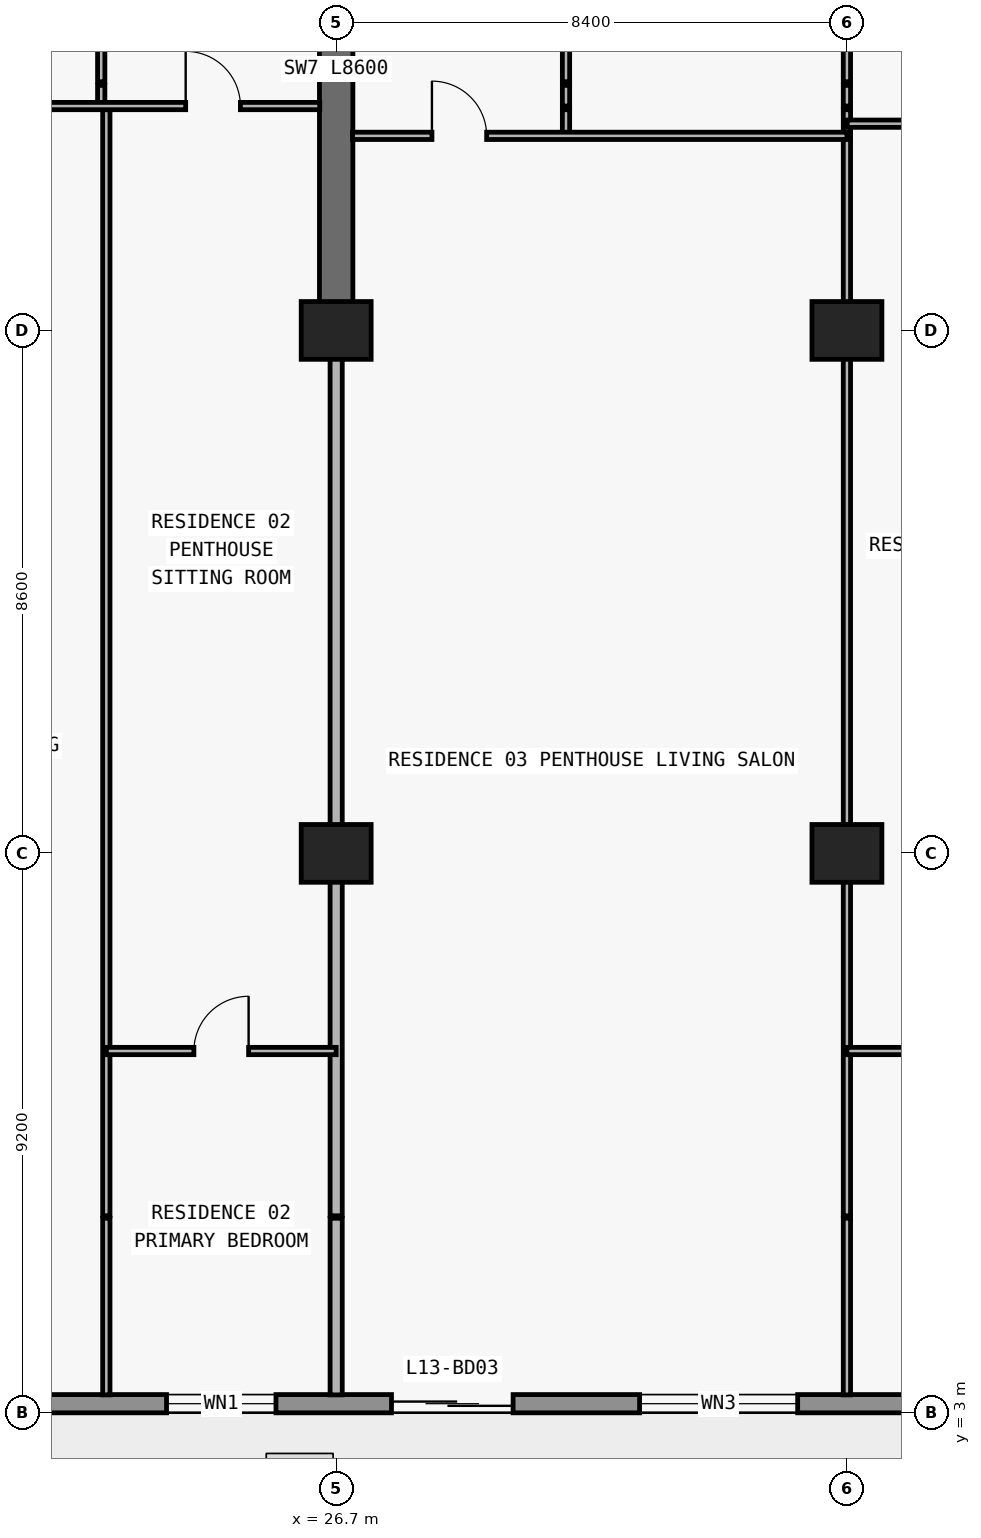
"""IFC4 building model, lengths in metres.
Left out: names, types, materials, properties, quantities, classifications, styles, units other than length and angle.
Written with IfcOpenShell. Run it as: python <this file> out.ifc"""

import sys

from ifc_helpers import new_model, si_unit, direction, frame, frame_2d, origin, origin_2d, place, context, subcontext, project, spatial, rectangle, extrude, element, fill, save


model = new_model("IFC4")
c1 = context("Model", 3, precision=1e-05, world=origin(), true_north=direction((0.0, 1.0)))
c2 = subcontext(c1, "Body", "Model", "MODEL_VIEW")
j1 = project(units=[si_unit("LENGTHUNIT", "METRE"), si_unit("PLANEANGLEUNIT", "RADIAN")], contexts=[c1])
p1 = place(None, origin())
s1 = spatial("IfcSite", under=j1, at=p1, CompositionType="ELEMENT")
p2 = place(p1, origin())
s2 = spatial("IfcBuilding", under=s1, at=p2, CompositionType="ELEMENT")
p3 = place(p2, frame((0.0, 0.0, 53.1)))
s3 = spatial("IfcBuildingStorey", under=s2, at=p3, CompositionType="ELEMENT", Elevation=53.1)
for number, where, z_axis, x_axis in (
    (1, (26.7, 12.2, 0.0), (0.0, 0.0, 1.0), (1.0, 0.0, 0.0)),
    (2, (35.1, 12.2, 0.0), (0.0, 0.0, 1.0), (1.0, 0.0, 0.0)),
    (3, (26.7, 20.8, 0.0), (0.0, 0.0, 1.0), (1.0, 0.0, 0.0)),
    (4, (35.1, 20.8, 0.0), (0.0, 0.0, 1.0), (1.0, 0.0, 0.0)),
):
    element("IfcColumn", number, at=place(p3, frame(where, z_axis=z_axis, x_axis=x_axis)), inside=s3, PredefinedType="COLUMN", context=c2, shape_type="SweptSolid", body=[
        extrude(rectangle(XDim=1.15, YDim=0.95, at=origin_2d()), origin(), (0.0, 0.0, 1.0), 3.05),
    ])
p4 = place(p3, frame((26.7, 20.8, 0.0), z_axis=(0.0, 0.0, 1.0), x_axis=(0.0, 1.0, 0.0)))
e5 = element("IfcWall", 5, at=p4, inside=s3, PredefinedType="SHEAR", context=c2, shape_type="SweptSolid", body=[
    extrude(rectangle(XDim=8.6, YDim=0.55, at=frame_2d((4.3, 0.0))), origin(), (0.0, 0.0, 1.0), 3.05),
])
p5 = place(p3, frame((72.7, 3.15, 0.0), z_axis=(0.0, 0.0, 1.0), x_axis=(-1.0, 0.0, 0.0)))
e6 = element("IfcWall", 6, at=p5, inside=s3, PredefinedType="STANDARD", context=c2, shape_type="SweptSolid", body=[
    extrude(rectangle(XDim=67.6, YDim=0.3, at=frame_2d((33.8, 0.0))), origin(), (0.0, 0.0, 1.0), 3.05),
])
p6 = place(p5, frame((59.826, 0.0, 0.0)))
e7 = element("IfcOpeningElement", 7, at=p6, cuts=e6, PredefinedType="OPENING", context=c2, shape_type="SweptSolid", body=[
    extrude(rectangle(XDim=2.0, YDim=2.3, at=frame_2d((1.0, 1.15))), frame((0.0, 0.16, 0.0), z_axis=(0.0, -1.0, 0.0), x_axis=(1.0, 0.0, 0.0)), (0.0, 0.0, 1.0), 0.32),
])
p7 = place(p5, frame((55.526, 0.0, 0.85)))
e8 = element("IfcOpeningElement", 8, at=p7, cuts=e6, PredefinedType="OPENING", context=c2, shape_type="SweptSolid", body=[
    extrude(rectangle(XDim=2.2, YDim=1.55, at=frame_2d((1.1, 0.775))), frame((0.0, 0.16, 0.0), z_axis=(0.0, -1.0, 0.0), x_axis=(1.0, 0.0, 0.0)), (0.0, 0.0, 1.0), 0.32),
])
p8 = place(p5, frame((51.09, 0.0, 0.0)))
e9 = element("IfcOpeningElement", 9, at=p8, cuts=e6, PredefinedType="OPENING", context=c2, shape_type="SweptSolid", body=[
    extrude(rectangle(XDim=2.0, YDim=2.3, at=frame_2d((1.0, 1.15))), frame((0.0, 0.16, 0.0), z_axis=(0.0, -1.0, 0.0), x_axis=(1.0, 0.0, 0.0)), (0.0, 0.0, 1.0), 0.32),
])
p9 = place(p5, frame((46.99, 0.0, 0.85)))
e10 = element("IfcOpeningElement", 10, at=p9, cuts=e6, PredefinedType="OPENING", context=c2, shape_type="SweptSolid", body=[
    extrude(rectangle(XDim=1.8, YDim=1.55, at=frame_2d((0.9, 0.775))), frame((0.0, 0.16, 0.0), z_axis=(0.0, -1.0, 0.0), x_axis=(1.0, 0.0, 0.0)), (0.0, 0.0, 1.0), 0.32),
])
p10 = place(p5, frame((43.09, 0.0, 0.0)))
e11 = element("IfcOpeningElement", 11, at=p10, cuts=e6, PredefinedType="OPENING", context=c2, shape_type="SweptSolid", body=[
    extrude(rectangle(XDim=2.0, YDim=2.3, at=frame_2d((1.0, 1.15))), frame((0.0, 0.16, 0.0), z_axis=(0.0, -1.0, 0.0), x_axis=(1.0, 0.0, 0.0)), (0.0, 0.0, 1.0), 0.32),
])
p11 = place(p5, frame((38.41, 0.0, 0.65)))
e12 = element("IfcOpeningElement", 12, at=p11, cuts=e6, PredefinedType="OPENING", context=c2, shape_type="SweptSolid", body=[
    extrude(rectangle(XDim=2.6, YDim=1.85, at=frame_2d((1.3, 0.925))), frame((0.0, 0.16, 0.0), z_axis=(0.0, -1.0, 0.0), x_axis=(1.0, 0.0, 0.0)), (0.0, 0.0, 1.0), 0.32),
])
p12 = place(p5, frame((32.7, 0.0, 0.85)))
e13 = element("IfcOpeningElement", 13, at=p12, cuts=e6, PredefinedType="OPENING", context=c2, shape_type="SweptSolid", body=[
    extrude(rectangle(XDim=2.2, YDim=1.55, at=frame_2d((1.1, 0.775))), frame((0.0, 0.16, 0.0), z_axis=(0.0, -1.0, 0.0), x_axis=(1.0, 0.0, 0.0)), (0.0, 0.0, 1.0), 0.32),
])
p13 = place(p5, frame((24.7, 0.0, 0.85)))
e14 = element("IfcOpeningElement", 14, at=p13, cuts=e6, PredefinedType="OPENING", context=c2, shape_type="SweptSolid", body=[
    extrude(rectangle(XDim=2.2, YDim=1.55, at=frame_2d((1.1, 0.775))), frame((0.0, 0.16, 0.0), z_axis=(0.0, -1.0, 0.0), x_axis=(1.0, 0.0, 0.0)), (0.0, 0.0, 1.0), 0.32),
])
p14 = place(p5, frame((18.29, 0.0, 0.0)))
e15 = element("IfcOpeningElement", 15, at=p14, cuts=e6, PredefinedType="OPENING", context=c2, shape_type="SweptSolid", body=[
    extrude(rectangle(XDim=2.0, YDim=2.3, at=frame_2d((1.0, 1.15))), frame((0.0, 0.16, 0.0), z_axis=(0.0, -1.0, 0.0), x_axis=(1.0, 0.0, 0.0)), (0.0, 0.0, 1.0), 0.32),
])
p15 = place(p5, frame((14.19, 0.0, 0.85)))
e16 = element("IfcOpeningElement", 16, at=p15, cuts=e6, PredefinedType="OPENING", context=c2, shape_type="SweptSolid", body=[
    extrude(rectangle(XDim=1.8, YDim=1.55, at=frame_2d((0.9, 0.775))), frame((0.0, 0.16, 0.0), z_axis=(0.0, -1.0, 0.0), x_axis=(1.0, 0.0, 0.0)), (0.0, 0.0, 1.0), 0.32),
])
p16 = place(p5, frame((10.226, 0.0, 0.0)))
e17 = element("IfcOpeningElement", 17, at=p16, cuts=e6, PredefinedType="OPENING", context=c2, shape_type="SweptSolid", body=[
    extrude(rectangle(XDim=2.0, YDim=2.3, at=frame_2d((1.0, 1.15))), frame((0.0, 0.16, 0.0), z_axis=(0.0, -1.0, 0.0), x_axis=(1.0, 0.0, 0.0)), (0.0, 0.0, 1.0), 0.32),
])
p17 = place(p5, frame((5.926, 0.0, 0.85)))
e18 = element("IfcOpeningElement", 18, at=p17, cuts=e6, PredefinedType="OPENING", context=c2, shape_type="SweptSolid", body=[
    extrude(rectangle(XDim=2.2, YDim=1.55, at=frame_2d((1.1, 0.775))), frame((0.0, 0.16, 0.0), z_axis=(0.0, -1.0, 0.0), x_axis=(1.0, 0.0, 0.0)), (0.0, 0.0, 1.0), 0.32),
])
p18 = place(p3, frame((22.836, 24.49, 0.0), z_axis=(0.0, 0.0, 1.0), x_axis=(0.0, 1.0, 0.0)))
e19 = element("IfcWall", 19, at=p18, inside=s3, PredefinedType="PARTITIONING", context=c2, shape_type="SweptSolid", body=[
    extrude(rectangle(XDim=0.34, YDim=0.12, at=frame_2d((0.17, 0.0))), origin(), (0.0, 0.0, 1.0), 3.05),
])
p19 = place(p3, frame((22.836, 24.89, 0.0), z_axis=(0.0, 0.0, 1.0), x_axis=(0.0, 1.0, 0.0)))
e20 = element("IfcWall", 20, at=p19, inside=s3, PredefinedType="PARTITIONING", context=c2, shape_type="SweptSolid", body=[
    extrude(rectangle(XDim=4.69, YDim=0.12, at=frame_2d((2.345, 0.0))), origin(), (0.0, 0.0, 1.0), 3.05),
])
p20 = place(p19, frame((1.895, 0.0, 0.0)))
e21 = element("IfcOpeningElement", 21, at=p20, cuts=e20, PredefinedType="OPENING", context=c2, shape_type="SweptSolid", body=[
    extrude(rectangle(XDim=0.9, YDim=2.15, at=frame_2d((0.45, 1.075))), frame((0.0, 0.07, 0.0), z_axis=(0.0, -1.0, 0.0), x_axis=(1.0, 0.0, 0.0)), (0.0, 0.0, 1.0), 0.14),
])
p21 = place(p3, frame((22.92, 3.295, 0.0), z_axis=(0.0, 0.0, 1.0), x_axis=(0.0, 1.0, 0.0)))
e22 = element("IfcWall", 22, at=p21, inside=s3, PredefinedType="PARTITIONING", context=c2, shape_type="SweptSolid", body=[
    extrude(rectangle(XDim=2.905, YDim=0.12, at=frame_2d((1.453, 0.0))), origin(), (0.0, 0.0, 1.0), 3.05),
])
p22 = place(p3, frame((22.92, 6.24, 0.0), z_axis=(0.0, 0.0, 1.0), x_axis=(0.0, 1.0, 0.0)))
e23 = element("IfcWall", 23, at=p22, inside=s3, PredefinedType="PARTITIONING", context=c2, shape_type="SweptSolid", body=[
    extrude(rectangle(XDim=18.19, YDim=0.12, at=frame_2d((9.095, 0.0))), origin(), (0.0, 0.0, 1.0), 3.05),
])
p23 = place(p3, frame((26.7, 3.295, 0.0), z_axis=(0.0, 0.0, 1.0), x_axis=(0.0, 1.0, 0.0)))
e24 = element("IfcWall", 24, at=p23, inside=s3, PredefinedType="PARTITIONING", context=c2, shape_type="SweptSolid", body=[
    extrude(rectangle(XDim=2.905, YDim=0.2, at=frame_2d((1.453, 0.0))), origin(), (0.0, 0.0, 1.0), 3.05),
])
p24 = place(p3, frame((26.7, 6.24, 0.0), z_axis=(0.0, 0.0, 1.0), x_axis=(0.0, 1.0, 0.0)))
e25 = element("IfcWall", 25, at=p24, inside=s3, PredefinedType="PARTITIONING", context=c2, shape_type="SweptSolid", body=[
    extrude(rectangle(XDim=14.555, YDim=0.2, at=frame_2d((7.277, 0.0))), origin(), (0.0, 0.0, 1.0), 2.11),
])
p25 = place(p3, frame((30.48, 24.0, 0.0), z_axis=(0.0, 0.0, 1.0), x_axis=(0.0, 1.0, 0.0)))
e26 = element("IfcWall", 26, at=p25, inside=s3, PredefinedType="PARTITIONING", context=c2, shape_type="SweptSolid", body=[
    extrude(rectangle(XDim=0.43, YDim=0.12, at=frame_2d((0.215, 0.0))), origin(), (0.0, 0.0, 1.0), 3.05),
])
p26 = place(p3, frame((30.48, 24.49, 0.0), z_axis=(0.0, 0.0, 1.0), x_axis=(0.0, 1.0, 0.0)))
e27 = element("IfcWall", 27, at=p26, inside=s3, PredefinedType="PARTITIONING", context=c2, shape_type="SweptSolid", body=[
    extrude(rectangle(XDim=0.34, YDim=0.12, at=frame_2d((0.17, 0.0))), origin(), (0.0, 0.0, 1.0), 3.05),
])
p27 = place(p3, frame((30.48, 24.89, 0.0), z_axis=(0.0, 0.0, 1.0), x_axis=(0.0, 1.0, 0.0)))
e28 = element("IfcWall", 28, at=p27, inside=s3, PredefinedType="PARTITIONING", context=c2, shape_type="SweptSolid", body=[
    extrude(rectangle(XDim=3.91, YDim=0.12, at=frame_2d((1.955, 0.0))), origin(), (0.0, 0.0, 1.0), 3.05),
])
p28 = place(p27, frame((1.505, 0.0, 0.0)))
e29 = element("IfcOpeningElement", 29, at=p28, cuts=e28, PredefinedType="OPENING", context=c2, shape_type="SweptSolid", body=[
    extrude(rectangle(XDim=0.9, YDim=2.15, at=frame_2d((0.45, 1.075))), frame((0.0, 0.07, 0.0), z_axis=(0.0, -1.0, 0.0), x_axis=(1.0, 0.0, 0.0)), (0.0, 0.0, 1.0), 0.14),
])
p29 = place(p3, frame((35.1, 3.295, 0.0), z_axis=(0.0, 0.0, 1.0), x_axis=(0.0, 1.0, 0.0)))
e30 = element("IfcWall", 30, at=p29, inside=s3, PredefinedType="PARTITIONING", context=c2, shape_type="SweptSolid", body=[
    extrude(rectangle(XDim=2.905, YDim=0.12, at=frame_2d((1.453, 0.0))), origin(), (0.0, 0.0, 1.0), 3.05),
])
p30 = place(p3, frame((35.1, 6.24, 0.0), z_axis=(0.0, 0.0, 1.0), x_axis=(0.0, 1.0, 0.0)))
e31 = element("IfcWall", 31, at=p30, inside=s3, PredefinedType="PARTITIONING", context=c2, shape_type="SweptSolid", body=[
    extrude(rectangle(XDim=18.19, YDim=0.12, at=frame_2d((9.095, 0.0))), origin(), (0.0, 0.0, 1.0), 2.11),
])
p31 = place(p3, frame((35.1, 24.49, 0.0), z_axis=(0.0, 0.0, 1.0), x_axis=(0.0, 1.0, 0.0)))
e32 = element("IfcWall", 32, at=p31, inside=s3, PredefinedType="PARTITIONING", context=c2, shape_type="SweptSolid", body=[
    extrude(rectangle(XDim=0.34, YDim=0.12, at=frame_2d((0.17, 0.0))), origin(), (0.0, 0.0, 1.0), 2.11),
])
p32 = place(p3, frame((35.1, 24.89, 0.0), z_axis=(0.0, 0.0, 1.0), x_axis=(0.0, 1.0, 0.0)))
e33 = element("IfcWall", 33, at=p32, inside=s3, PredefinedType="PARTITIONING", context=c2, shape_type="SweptSolid", body=[
    extrude(rectangle(XDim=4.69, YDim=0.12, at=frame_2d((2.345, 0.0))), origin(), (0.0, 0.0, 1.0), 2.11),
])
p33 = place(p32, frame((1.405, 0.0, 0.0)))
e34 = element("IfcOpeningElement", 34, at=p33, cuts=e33, PredefinedType="OPENING", context=c2, shape_type="SweptSolid", body=[
    extrude(rectangle(XDim=0.9, YDim=2.06, at=frame_2d((0.45, 1.03))), frame((0.0, 0.07, 0.0), z_axis=(0.0, -1.0, 0.0), x_axis=(1.0, 0.0, 0.0)), (0.0, 0.0, 1.0), 0.14),
])
p34 = place(p3, frame((22.92, 8.95, 0.0), z_axis=(0.0, 0.0, 1.0), x_axis=(1.0, 0.0, 0.0)))
e35 = element("IfcWall", 35, at=p34, inside=s3, PredefinedType="PARTITIONING", context=c2, shape_type="SweptSolid", body=[
    extrude(rectangle(XDim=3.78, YDim=0.12, at=frame_2d((1.89, 0.0))), origin(), (0.0, 0.0, 1.0), 3.05),
])
p35 = place(p34, frame((1.44, 0.0, 0.0)))
e36 = element("IfcOpeningElement", 36, at=p35, cuts=e35, PredefinedType="OPENING", context=c2, shape_type="SweptSolid", body=[
    extrude(rectangle(XDim=0.9, YDim=2.15, at=frame_2d((0.45, 1.075))), frame((0.0, 0.07, 0.0), z_axis=(0.0, -1.0, 0.0), x_axis=(1.0, 0.0, 0.0)), (0.0, 0.0, 1.0), 0.14),
])
p36 = place(p3, frame((35.1, 8.95, 0.0), z_axis=(0.0, 0.0, 1.0), x_axis=(1.0, 0.0, 0.0)))
e37 = element("IfcWall", 37, at=p36, inside=s3, PredefinedType="PARTITIONING", context=c2, shape_type="SweptSolid", body=[
    extrude(rectangle(XDim=16.0, YDim=0.12, at=frame_2d((8.0, 0.0))), origin(), (0.0, 0.0, 1.0), 3.05),
])
p37 = place(p36, frame((3.35, 0.0, 0.0)))
e38 = element("IfcOpeningElement", 38, at=p37, cuts=e37, PredefinedType="OPENING", context=c2, shape_type="SweptSolid", body=[
    extrude(rectangle(XDim=0.9, YDim=2.15, at=frame_2d((0.45, 1.075))), frame((0.0, 0.07, 0.0), z_axis=(0.0, -1.0, 0.0), x_axis=(1.0, 0.0, 0.0)), (0.0, 0.0, 1.0), 0.14),
])
p38 = place(p36, frame((11.35, 0.0, 0.0)))
e39 = element("IfcOpeningElement", 39, at=p38, cuts=e37, PredefinedType="OPENING", context=c2, shape_type="SweptSolid", body=[
    extrude(rectangle(XDim=0.9, YDim=2.15, at=frame_2d((0.45, 1.075))), frame((0.0, 0.07, 0.0), z_axis=(0.0, -1.0, 0.0), x_axis=(1.0, 0.0, 0.0)), (0.0, 0.0, 1.0), 0.14),
])
p39 = place(p3, frame((26.97, 24.0, 0.0), z_axis=(0.0, 0.0, 1.0), x_axis=(1.0, 0.0, 0.0)))
e40 = element("IfcWall", 40, at=p39, inside=s3, PredefinedType="PARTITIONING", context=c2, shape_type="SweptSolid", body=[
    extrude(rectangle(XDim=8.13, YDim=0.12, at=frame_2d((4.065, 0.0))), origin(), (0.0, 0.0, 1.0), 3.05),
])
p40 = place(p39, frame((1.305, 0.0, 0.0)))
e41 = element("IfcOpeningElement", 41, at=p40, cuts=e40, PredefinedType="OPENING", context=c2, shape_type="SweptSolid", body=[
    extrude(rectangle(XDim=0.9, YDim=2.15, at=frame_2d((0.45, 1.075))), frame((0.0, 0.07, 0.0), z_axis=(0.0, -1.0, 0.0), x_axis=(1.0, 0.0, 0.0)), (0.0, 0.0, 1.0), 0.14),
])
p41 = place(p3, frame((35.105, 24.2, 0.0), z_axis=(0.0, 0.0, 1.0), x_axis=(1.0, 0.0, 0.0)))
e42 = element("IfcWall", 42, at=p41, inside=s3, PredefinedType="PARTITIONING", context=c2, shape_type="SweptSolid", body=[
    extrude(rectangle(XDim=7.59, YDim=0.12, at=frame_2d((3.795, 0.0))), origin(), (0.0, 0.0, 1.0), 3.05),
])
p42 = place(p41, frame((3.345, 0.0, 0.0)))
e43 = element("IfcOpeningElement", 43, at=p42, cuts=e42, PredefinedType="OPENING", context=c2, shape_type="SweptSolid", body=[
    extrude(rectangle(XDim=0.9, YDim=2.15, at=frame_2d((0.45, 1.075))), frame((0.0, 0.07, 0.0), z_axis=(0.0, -1.0, 0.0), x_axis=(1.0, 0.0, 0.0)), (0.0, 0.0, 1.0), 0.14),
])
p43 = place(p3, frame((18.3, 24.49, 0.0), z_axis=(0.0, 0.0, 1.0), x_axis=(1.0, 0.0, 0.0)))
e44 = element("IfcWall", 44, at=p43, inside=s3, PredefinedType="PARTITIONING", context=c2, shape_type="SweptSolid", body=[
    extrude(rectangle(XDim=8.13, YDim=0.12, at=frame_2d((4.065, 0.0))), origin(), (0.0, 0.0, 1.0), 3.05),
])
p44 = place(p43, frame((1.818, 0.0, 0.0)))
e45 = element("IfcOpeningElement", 45, at=p44, cuts=e44, PredefinedType="OPENING", context=c2, shape_type="SweptSolid", body=[
    extrude(rectangle(XDim=0.9, YDim=2.15, at=frame_2d((0.45, 1.075))), frame((0.0, 0.07, 0.0), z_axis=(0.0, -1.0, 0.0), x_axis=(1.0, 0.0, 0.0)), (0.0, 0.0, 1.0), 0.14),
])
p45 = place(p43, frame((5.925, 0.0, 0.0)))
e46 = element("IfcOpeningElement", 46, at=p45, cuts=e44, PredefinedType="OPENING", context=c2, shape_type="SweptSolid", body=[
    extrude(rectangle(XDim=0.9, YDim=2.15, at=frame_2d((0.45, 1.075))), frame((0.0, 0.07, 0.0), z_axis=(0.0, -1.0, 0.0), x_axis=(1.0, 0.0, 0.0)), (0.0, 0.0, 1.0), 0.14),
])
p46 = place(p9, origin())
e47 = element("IfcWindow", 47, at=p46, inside=s3, PartitioningType="SINGLE_PANEL", PredefinedType="WINDOW", context=c2, shape_type="SweptSolid", body=[
    extrude(rectangle(XDim=1.8, YDim=1.55, at=frame_2d((0.9, 0.775))), frame((0.0, 0.03, 0.0), z_axis=(0.0, -1.0, 0.0), x_axis=(1.0, 0.0, 0.0)), (0.0, 0.0, 1.0), 0.06),
])
fill(e10, e47)
p47 = place(p10, origin())
e48 = element("IfcDoor", 48, at=p47, inside=s3, OperationType="DOUBLE_DOOR_SLIDING", PredefinedType="DOOR", context=c2, shape_type="SweptSolid", body=[
    extrude(rectangle(XDim=2.0, YDim=2.3, at=frame_2d((1.0, 1.15))), frame((0.0, 0.025, 0.0), z_axis=(0.0, -1.0, 0.0), x_axis=(1.0, 0.0, 0.0)), (0.0, 0.0, 1.0), 0.05),
])
fill(e11, e48)
p48 = place(p11, origin())
e49 = element("IfcWindow", 49, at=p48, inside=s3, PartitioningType="SINGLE_PANEL", PredefinedType="WINDOW", context=c2, shape_type="SweptSolid", body=[
    extrude(rectangle(XDim=2.6, YDim=1.85, at=frame_2d((1.3, 0.925))), frame((0.0, 0.03, 0.0), z_axis=(0.0, -1.0, 0.0), x_axis=(1.0, 0.0, 0.0)), (0.0, 0.0, 1.0), 0.06),
])
fill(e12, e49)
p49 = place(p45, origin())
e50 = element("IfcDoor", 50, at=p49, inside=s3, OperationType="SINGLE_SWING_LEFT", PredefinedType="DOOR", context=c2, shape_type="SweptSolid", body=[
    extrude(rectangle(XDim=0.9, YDim=2.15, at=frame_2d((0.45, 1.075))), frame((0.0, 0.025, 0.0), z_axis=(0.0, -1.0, 0.0), x_axis=(1.0, 0.0, 0.0)), (0.0, 0.0, 1.0), 0.05),
])
fill(e46, e50)
p50 = place(p35, origin())
e51 = element("IfcDoor", 51, at=p50, inside=s3, OperationType="SINGLE_SWING_RIGHT", PredefinedType="DOOR", context=c2, shape_type="SweptSolid", body=[
    extrude(rectangle(XDim=0.9, YDim=2.15, at=frame_2d((0.45, 1.075))), frame((0.0, 0.025, 0.0), z_axis=(0.0, -1.0, 0.0), x_axis=(1.0, 0.0, 0.0)), (0.0, 0.0, 1.0), 0.05),
])
fill(e36, e51)
p51 = place(p40, origin())
e52 = element("IfcDoor", 52, at=p51, inside=s3, OperationType="SINGLE_SWING_LEFT", PredefinedType="DOOR", context=c2, shape_type="SweptSolid", body=[
    extrude(rectangle(XDim=0.9, YDim=2.15, at=frame_2d((0.45, 1.075))), frame((0.0, 0.025, 0.0), z_axis=(0.0, -1.0, 0.0), x_axis=(1.0, 0.0, 0.0)), (0.0, 0.0, 1.0), 0.05),
])
fill(e41, e52)
save(model, sys.argv[1])
